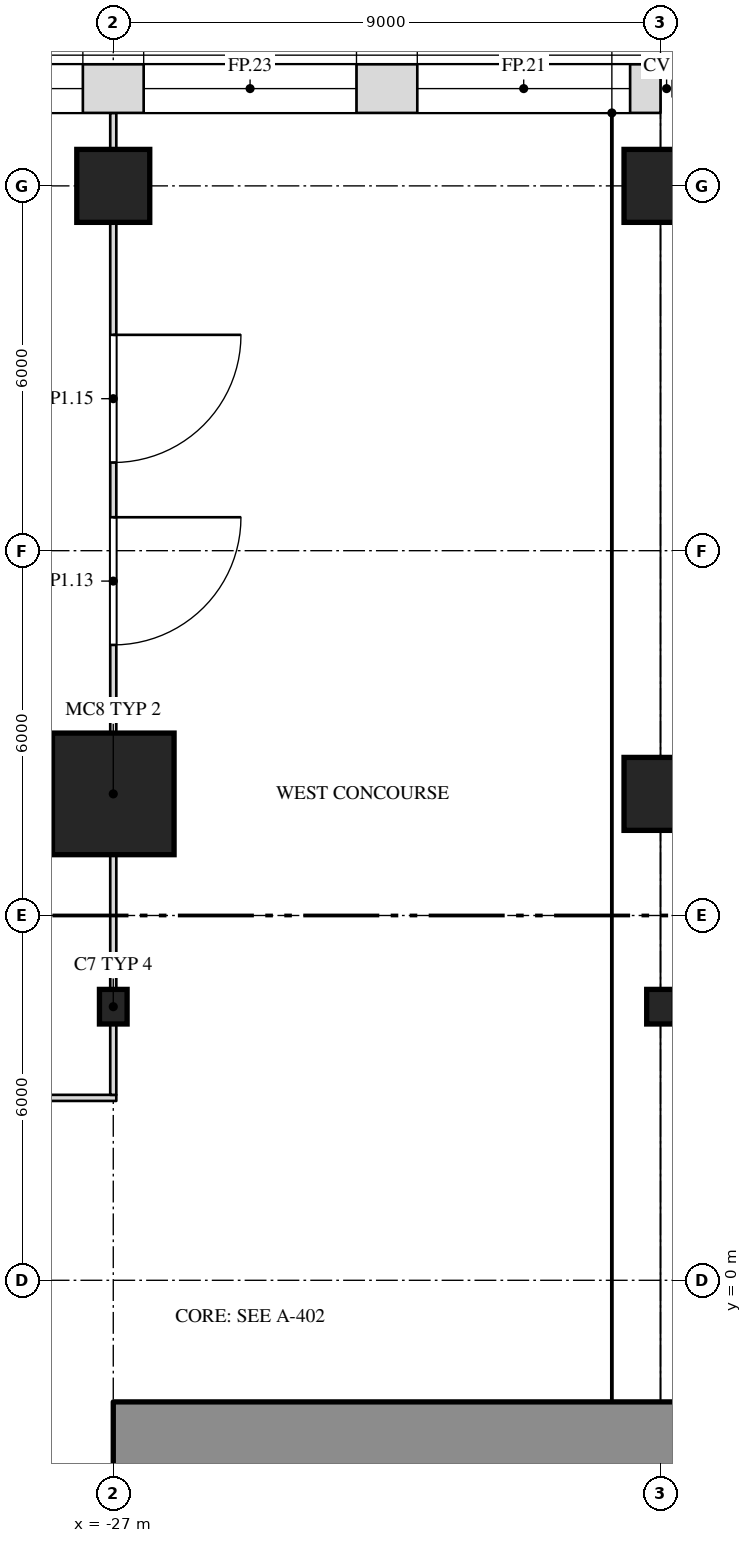
"""IFC4 building model, lengths in metres.
Left out: names, types, materials, properties, quantities, classifications, styles, units other than length and angle.
Written with IfcOpenShell. Run it as: python <this file> out.ifc"""

import sys

from ifc_helpers import new_model, si_unit, direction, frame, frame_2d, origin, origin_2d, place, context, subcontext, project, spatial, rectangle, i_section, extrude, element, fill, save


model = new_model("IFC4")
c1 = context("Model", 3, precision=1e-05, world=origin(), true_north=direction((0.0, 1.0)))
c2 = subcontext(c1, "Body", "Model", "MODEL_VIEW")
j1 = project(units=[si_unit("LENGTHUNIT", "METRE"), si_unit("PLANEANGLEUNIT", "RADIAN")], contexts=[c1])
p1 = place(None, origin())
s1 = spatial("IfcSite", under=j1, at=p1, CompositionType="ELEMENT")
p2 = place(p1, origin())
s2 = spatial("IfcBuilding", under=s1, at=p2, CompositionType="ELEMENT")
p3 = place(p2, frame((0.0, 0.0, 9.0)))
s3 = spatial("IfcBuildingStorey", under=s2, at=p3, CompositionType="ELEMENT", Elevation=9.0)
for number, where, z_axis, x_axis in (
    (1, (-27.0, 4.5, 0.0), (0.0, 0.0, 1.0), (1.0, 0.0, 0.0)),
    (2, (-18.0, 4.5, 0.0), (0.0, 0.0, 1.0), (1.0, 0.0, 0.0)),
):
    element("IfcColumn", number, at=place(p3, frame(where, z_axis=z_axis, x_axis=x_axis)), inside=s3, PredefinedType="COLUMN", context=c2, shape_type="SweptSolid", body=[
        extrude(i_section(OverallWidth=0.455, OverallDepth=0.569, WebThickness=0.078, FlangeThickness=0.125, at=origin_2d()), origin(), (0.0, 0.0, 1.0), 6.0),
    ])
p4 = place(p3, frame((-27.0, 8.0, 0.0), z_axis=(0.0, 0.0, 1.0), x_axis=(1.0, 0.0, 0.0)))
e3 = element("IfcColumn", 3, at=p4, inside=s3, PredefinedType="COLUMN", context=c2, shape_type="SweptSolid", body=[
    extrude(rectangle(XDim=2.0, YDim=2.0, at=origin_2d()), origin(), (0.0, 0.0, 1.0), 6.0),
])
for number, where, z_axis, x_axis in (
    (4, (-18.0, 8.0, 0.0), (0.0, 0.0, 1.0), (1.0, 0.0, 0.0)),
    (5, (-27.0, 18.0, 0.0), (0.0, 0.0, 1.0), (1.0, 0.0, 0.0)),
    (6, (-18.0, 18.0, 0.0), (0.0, 0.0, 1.0), (1.0, 0.0, 0.0)),
):
    element("IfcColumn", number, at=place(p3, frame(where, z_axis=z_axis, x_axis=x_axis)), inside=s3, PredefinedType="COLUMN", context=c2, shape_type="SweptSolid", body=[
        extrude(rectangle(XDim=1.2, YDim=1.2, at=origin_2d()), origin(), (0.0, 0.0, 1.0), 6.0),
    ])
p5 = place(p3, frame((-27.0, -2.6, 0.0), z_axis=(0.0, 0.0, 1.0), x_axis=(1.0, 0.0, 0.0)))
e7 = element("IfcWall", 7, at=p5, inside=s3, PredefinedType="SHEAR", context=c2, shape_type="SweptSolid", body=[
    extrude(rectangle(XDim=54.0, YDim=1.2, at=frame_2d((27.0, 0.0))), origin(), (0.0, 0.0, 1.0), 5.7),
])
p6 = place(p3, frame((-38.2, 3.0, 0.0), z_axis=(0.0, 0.0, 1.0), x_axis=(1.0, 0.0, 0.0)))
e8 = element("IfcWall", 8, at=p6, inside=s3, PredefinedType="PARTITIONING", context=c2, shape_type="SweptSolid", body=[
    extrude(rectangle(XDim=11.25, YDim=0.1, at=frame_2d((5.625, 0.0))), origin(), (0.0, 0.0, 1.0), 5.7),
])
p7 = place(p3, frame((-27.0, 3.05, 0.0), z_axis=(0.0, 0.0, 1.0), x_axis=(0.0, 1.0, 0.0)))
e9 = element("IfcWall", 9, at=p7, inside=s3, PredefinedType="PARTITIONING", context=c2, shape_type="SweptSolid", body=[
    extrude(rectangle(XDim=1.166, YDim=0.1, at=frame_2d((0.583, 0.0))), origin(), (0.0, 0.0, 1.0), 5.088),
])
p8 = place(p3, frame((-27.0, 4.784, 0.0), z_axis=(0.0, 0.0, 1.0), x_axis=(0.0, 1.0, 0.0)))
e10 = element("IfcWall", 10, at=p8, inside=s3, PredefinedType="PARTITIONING", context=c2, shape_type="SweptSolid", body=[
    extrude(rectangle(XDim=2.216, YDim=0.1, at=frame_2d((1.108, 0.0))), origin(), (0.0, 0.0, 1.0), 5.088),
])
p9 = place(p3, frame((-27.0, 9.0, 0.0), z_axis=(0.0, 0.0, 1.0), x_axis=(0.0, 1.0, 0.0)))
e11 = element("IfcWall", 11, at=p9, inside=s3, PredefinedType="PARTITIONING", context=c2, shape_type="SweptSolid", body=[
    extrude(rectangle(XDim=8.4, YDim=0.1, at=frame_2d((4.2, 0.0))), origin(), (0.0, 0.0, 1.0), 5.088),
])
p10 = place(p9, frame((1.45, 0.0, 0.0)))
e12 = element("IfcOpeningElement", 12, at=p10, cuts=e11, PredefinedType="OPENING", context=c2, shape_type="SweptSolid", body=[
    extrude(rectangle(XDim=2.1, YDim=2.4, at=frame_2d((1.05, 1.2))), frame((0.0, 0.062, 0.0), z_axis=(0.0, -1.0, 0.0), x_axis=(1.0, 0.0, 0.0)), (0.0, 0.0, 1.0), 0.124),
])
p11 = place(p9, frame((4.45, 0.0, 0.0)))
e13 = element("IfcOpeningElement", 13, at=p11, cuts=e11, PredefinedType="OPENING", context=c2, shape_type="SweptSolid", body=[
    extrude(rectangle(XDim=2.1, YDim=2.4, at=frame_2d((1.05, 1.2))), frame((0.0, 0.062, 0.0), z_axis=(0.0, -1.0, 0.0), x_axis=(1.0, 0.0, 0.0)), (0.0, 0.0, 1.0), 0.124),
])
p12 = place(p3, frame((-27.0, 18.6, 0.0), z_axis=(0.0, 0.0, 1.0), x_axis=(0.0, 1.0, 0.0)))
e14 = element("IfcWall", 14, at=p12, inside=s3, PredefinedType="PARTITIONING", context=c2, shape_type="SweptSolid", body=[
    extrude(rectangle(XDim=0.6, YDim=0.1, at=frame_2d((0.3, 0.0))), origin(), (0.0, 0.0, 1.0), 5.7),
])
p13 = place(p3, frame((-18.0, 19.6, 0.0), z_axis=(0.0, 0.0, 1.0), x_axis=(-1.0, 0.0, 0.0)))
e15 = element("IfcWall", 15, at=p13, inside=s3, PredefinedType="SOLIDWALL", context=c2, shape_type="SweptSolid", body=[
    extrude(rectangle(XDim=14.948, YDim=0.8, at=frame_2d((7.474, 0.0))), origin(), (0.0, 0.0, 1.0), 5.7),
])
p14 = place(p13, frame((0.5, 0.0, 1.0)))
e16 = element("IfcOpeningElement", 16, at=p14, cuts=e15, PredefinedType="OPENING", context=c2, shape_type="SweptSolid", body=[
    extrude(rectangle(XDim=3.5, YDim=4.0, at=frame_2d((1.75, 2.0))), frame((0.0, 0.412, 0.0), z_axis=(0.0, -1.0, 0.0), x_axis=(1.0, 0.0, 0.0)), (0.0, 0.0, 1.0), 0.824),
])
p15 = place(p13, frame((5.0, 0.0, 1.0)))
e17 = element("IfcOpeningElement", 17, at=p15, cuts=e15, PredefinedType="OPENING", context=c2, shape_type="SweptSolid", body=[
    extrude(rectangle(XDim=3.5, YDim=4.0, at=frame_2d((1.75, 2.0))), frame((0.0, 0.412, 0.0), z_axis=(0.0, -1.0, 0.0), x_axis=(1.0, 0.0, 0.0)), (0.0, 0.0, 1.0), 0.824),
])
p16 = place(p13, frame((9.5, 0.0, 1.0)))
e18 = element("IfcOpeningElement", 18, at=p16, cuts=e15, PredefinedType="OPENING", context=c2, shape_type="SweptSolid", body=[
    extrude(rectangle(XDim=3.5, YDim=4.0, at=frame_2d((1.75, 2.0))), frame((0.0, 0.412, 0.0), z_axis=(0.0, -1.0, 0.0), x_axis=(1.0, 0.0, 0.0)), (0.0, 0.0, 1.0), 0.824),
])
p17 = place(p10, origin())
e19 = element("IfcDoor", 19, at=p17, inside=s3, OperationType="DOUBLE_DOOR_SINGLE_SWING", PredefinedType="DOOR", context=c2, shape_type="SweptSolid", body=[
    extrude(rectangle(XDim=2.1, YDim=2.4, at=frame_2d((1.05, 1.2))), frame((0.0, 0.025, 0.0), z_axis=(0.0, -1.0, 0.0), x_axis=(1.0, 0.0, 0.0)), (0.0, 0.0, 1.0), 0.05),
])
fill(e12, e19)
p18 = place(p11, origin())
e20 = element("IfcDoor", 20, at=p18, inside=s3, OperationType="DOUBLE_DOOR_SINGLE_SWING", PredefinedType="DOOR", context=c2, shape_type="SweptSolid", body=[
    extrude(rectangle(XDim=2.1, YDim=2.4, at=frame_2d((1.05, 1.2))), frame((0.0, 0.025, 0.0), z_axis=(0.0, -1.0, 0.0), x_axis=(1.0, 0.0, 0.0)), (0.0, 0.0, 1.0), 0.05),
])
fill(e13, e20)
p19 = place(p14, origin())
e21 = element("IfcWindow", 21, at=p19, inside=s3, PartitioningType="SINGLE_PANEL", PredefinedType="WINDOW", context=c2, shape_type="SweptSolid", body=[
    extrude(rectangle(XDim=3.5, YDim=4.0, at=frame_2d((1.75, 2.0))), frame((0.0, 0.03, 0.0), z_axis=(0.0, -1.0, 0.0), x_axis=(1.0, 0.0, 0.0)), (0.0, 0.0, 1.0), 0.06),
])
fill(e16, e21)
p20 = place(p15, origin())
e22 = element("IfcWindow", 22, at=p20, inside=s3, PartitioningType="SINGLE_PANEL", PredefinedType="WINDOW", context=c2, shape_type="SweptSolid", body=[
    extrude(rectangle(XDim=3.5, YDim=4.0, at=frame_2d((1.75, 2.0))), frame((0.0, 0.03, 0.0), z_axis=(0.0, -1.0, 0.0), x_axis=(1.0, 0.0, 0.0)), (0.0, 0.0, 1.0), 0.06),
])
fill(e17, e22)
p21 = place(p16, origin())
e23 = element("IfcWindow", 23, at=p21, inside=s3, PartitioningType="SINGLE_PANEL", PredefinedType="WINDOW", context=c2, shape_type="SweptSolid", body=[
    extrude(rectangle(XDim=3.5, YDim=4.0, at=frame_2d((1.75, 2.0))), frame((0.0, 0.03, 0.0), z_axis=(0.0, -1.0, 0.0), x_axis=(1.0, 0.0, 0.0)), (0.0, 0.0, 1.0), 0.06),
])
fill(e18, e23)
save(model, sys.argv[1])
